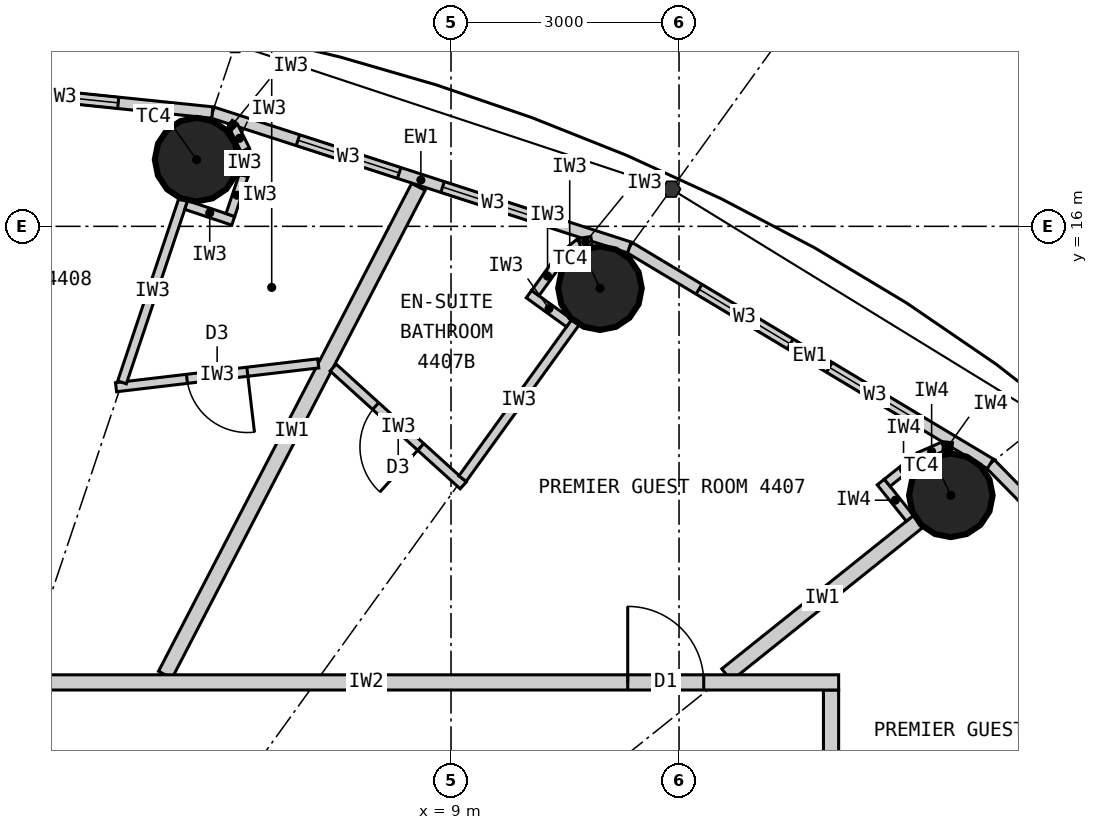
"""IFC4 building model, lengths in metres.
Left out: names, types, materials, properties, quantities, classifications, styles, units other than length and angle.
Written with IfcOpenShell. Run it as: python <this file> out.ifc"""

import sys

from ifc_helpers import new_model, si_unit, direction, frame, frame_2d, origin, origin_2d, place, context, subcontext, project, spatial, rectangle, circle, extrude, element, fill, save


model = new_model("IFC4")
c1 = context("Model", 3, precision=1e-05, world=origin(), true_north=direction((0.0, 1.0)))
c2 = subcontext(c1, "Body", "Model", "MODEL_VIEW")
j1 = project(units=[si_unit("LENGTHUNIT", "METRE"), si_unit("PLANEANGLEUNIT", "RADIAN")], contexts=[c1])
p1 = place(None, origin())
s1 = spatial("IfcSite", under=j1, at=p1, CompositionType="ELEMENT")
p2 = place(p1, origin())
s2 = spatial("IfcBuilding", under=s1, at=p2, CompositionType="ELEMENT")
p3 = place(p2, frame((0.0, 0.0, 166.5)))
s3 = spatial("IfcBuildingStorey", under=s2, at=p3, CompositionType="ELEMENT", Elevation=166.5)
for number, where, z_axis, x_axis in (
    (1, (15.576, 12.461, 0.0), (0.0, 0.0, 1.0), (1.0, 0.0, 0.0)),
    (2, (10.96, 15.186, 0.0), (0.0, 0.0, 1.0), (1.0, 0.0, 0.0)),
    (3, (5.653, 16.877, 0.0), (0.0, 0.0, 1.0), (1.0, 0.0, 0.0)),
):
    element("IfcColumn", number, at=place(p3, frame(where, z_axis=z_axis, x_axis=x_axis)), inside=s3, PredefinedType="COLUMN", context=c2, shape_type="SweptSolid", body=[
        extrude(circle(Radius=0.55, at=origin_2d()), origin(), (0.0, 0.0, 1.0), 3.3),
    ])
p4 = place(p3, frame((19.772, 9.132, 0.0), z_axis=(0.0, 0.0, 1.0), x_axis=(-0.700727467776, 0.71342905457, 0.0)))
e4 = element("IfcWall", 4, at=p4, inside=s3, PredefinedType="ELEMENTEDWALL", context=c2, shape_type="SweptSolid", body=[
    extrude(rectangle(XDim=5.247, YDim=0.15, at=frame_2d((2.624, 0.0))), origin(), (0.0, 0.0, 1.0), 3.12),
])
p5 = place(p4, frame((0.924, 0.0, 0.9)))
e5 = element("IfcOpeningElement", 5, at=p5, cuts=e4, PredefinedType="OPENING", context=c2, shape_type="SweptSolid", body=[
    extrude(rectangle(XDim=1.4, YDim=1.9, at=frame_2d((0.7, 0.95))), frame((0.0, 0.085, 0.0), z_axis=(0.0, -1.0, 0.0), x_axis=(1.0, 0.0, 0.0)), (0.0, 0.0, 1.0), 0.17),
])
p6 = place(p4, frame((2.924, 0.0, 0.9)))
e6 = element("IfcOpeningElement", 6, at=p6, cuts=e4, PredefinedType="OPENING", context=c2, shape_type="SweptSolid", body=[
    extrude(rectangle(XDim=1.4, YDim=1.9, at=frame_2d((0.7, 0.95))), frame((0.0, 0.085, 0.0), z_axis=(0.0, -1.0, 0.0), x_axis=(1.0, 0.0, 0.0)), (0.0, 0.0, 1.0), 0.17),
])
p7 = place(p3, frame((16.095, 12.876, 0.0), z_axis=(0.0, 0.0, 1.0), x_axis=(-0.857695199231, 0.514158482587, 0.0)))
e7 = element("IfcWall", 7, at=p7, inside=s3, PredefinedType="ELEMENTEDWALL", context=c2, shape_type="SweptSolid", body=[
    extrude(rectangle(XDim=5.536, YDim=0.15, at=frame_2d((2.768, 0.0))), origin(), (0.0, 0.0, 1.0), 3.12),
])
p8 = place(p7, frame((1.068, 0.0, 0.9)))
e8 = element("IfcOpeningElement", 8, at=p8, cuts=e7, PredefinedType="OPENING", context=c2, shape_type="SweptSolid", body=[
    extrude(rectangle(XDim=1.4, YDim=1.9, at=frame_2d((0.7, 0.95))), frame((0.0, 0.085, 0.0), z_axis=(0.0, -1.0, 0.0), x_axis=(1.0, 0.0, 0.0)), (0.0, 0.0, 1.0), 0.17),
])
p9 = place(p7, frame((3.068, 0.0, 0.9)))
e9 = element("IfcOpeningElement", 9, at=p9, cuts=e7, PredefinedType="OPENING", context=c2, shape_type="SweptSolid", body=[
    extrude(rectangle(XDim=1.4, YDim=1.9, at=frame_2d((0.7, 0.95))), frame((0.0, 0.085, 0.0), z_axis=(0.0, -1.0, 0.0), x_axis=(1.0, 0.0, 0.0)), (0.0, 0.0, 1.0), 0.17),
])
p10 = place(p3, frame((11.346, 15.722, 0.0), z_axis=(0.0, 0.0, 1.0), x_axis=(-0.951432482129, 0.307857486429, 0.0)))
e10 = element("IfcWall", 10, at=p10, inside=s3, PredefinedType="ELEMENTEDWALL", context=c2, shape_type="SweptSolid", body=[
    extrude(rectangle(XDim=5.766, YDim=0.15, at=frame_2d((2.883, 0.0))), origin(), (0.0, 0.0, 1.0), 3.12),
])
p11 = place(p10, frame((1.183, 0.0, 0.9)))
e11 = element("IfcOpeningElement", 11, at=p11, cuts=e10, PredefinedType="OPENING", context=c2, shape_type="SweptSolid", body=[
    extrude(rectangle(XDim=1.4, YDim=1.9, at=frame_2d((0.7, 0.95))), frame((0.0, 0.085, 0.0), z_axis=(0.0, -1.0, 0.0), x_axis=(1.0, 0.0, 0.0)), (0.0, 0.0, 1.0), 0.17),
])
p12 = place(p10, frame((3.183, 0.0, 0.9)))
e12 = element("IfcOpeningElement", 12, at=p12, cuts=e10, PredefinedType="OPENING", context=c2, shape_type="SweptSolid", body=[
    extrude(rectangle(XDim=1.4, YDim=1.9, at=frame_2d((0.7, 0.95))), frame((0.0, 0.085, 0.0), z_axis=(0.0, -1.0, 0.0), x_axis=(1.0, 0.0, 0.0)), (0.0, 0.0, 1.0), 0.17),
])
p13 = place(p3, frame((5.86, 17.497, 0.0), z_axis=(0.0, 0.0, 1.0), x_axis=(-0.994751738032, 0.102318032045, 0.0)))
e13 = element("IfcWall", 13, at=p13, inside=s3, PredefinedType="ELEMENTEDWALL", context=c2, shape_type="SweptSolid", body=[
    extrude(rectangle(XDim=5.891, YDim=0.15, at=frame_2d((2.946, 0.0))), origin(), (0.0, 0.0, 1.0), 3.12),
])
p14 = place(p13, frame((1.246, 0.0, 0.9)))
e14 = element("IfcOpeningElement", 14, at=p14, cuts=e13, PredefinedType="OPENING", context=c2, shape_type="SweptSolid", body=[
    extrude(rectangle(XDim=1.4, YDim=1.9, at=frame_2d((0.7, 0.95))), frame((0.0, 0.085, 0.0), z_axis=(0.0, -1.0, 0.0), x_axis=(1.0, 0.0, 0.0)), (0.0, 0.0, 1.0), 0.17),
])
p15 = place(p13, frame((3.246, 0.0, 0.9)))
e15 = element("IfcOpeningElement", 15, at=p15, cuts=e13, PredefinedType="OPENING", context=c2, shape_type="SweptSolid", body=[
    extrude(rectangle(XDim=1.4, YDim=1.9, at=frame_2d((0.7, 0.95))), frame((0.0, 0.085, 0.0), z_axis=(0.0, -1.0, 0.0), x_axis=(1.0, 0.0, 0.0)), (0.0, 0.0, 1.0), 0.17),
])
p16 = place(p3, frame((14.0, -9.9, 0.0), z_axis=(0.0, 0.0, 1.0), x_axis=(0.0, 1.0, 0.0)))
e16 = element("IfcWall", 16, at=p16, inside=s3, PredefinedType="PARTITIONING", context=c2, shape_type="SweptSolid", body=[
    extrude(rectangle(XDim=19.8, YDim=0.2, at=frame_2d((9.9, 0.0))), origin(), (0.0, 0.0, 1.0), 3.12),
])
p17 = place(p16, frame((3.688, 0.0, 0.0)))
e17 = element("IfcOpeningElement", 17, at=p17, cuts=e16, PredefinedType="OPENING", context=c2, shape_type="SweptSolid", body=[
    extrude(rectangle(XDim=1.0, YDim=2.2, at=frame_2d((0.5, 1.1))), frame((0.0, 0.11, 0.0), z_axis=(0.0, -1.0, 0.0), x_axis=(1.0, 0.0, 0.0)), (0.0, 0.0, 1.0), 0.22),
])
p18 = place(p16, frame((9.979, 0.0, 0.0)))
e18 = element("IfcOpeningElement", 18, at=p18, cuts=e16, PredefinedType="OPENING", context=c2, shape_type="SweptSolid", body=[
    extrude(rectangle(XDim=1.0, YDim=2.2, at=frame_2d((0.5, 1.1))), frame((0.0, 0.11, 0.0), z_axis=(0.0, -1.0, 0.0), x_axis=(1.0, 0.0, 0.0)), (0.0, 0.0, 1.0), 0.22),
])
p19 = place(p16, frame((17.122, 0.0, 0.0)))
e19 = element("IfcOpeningElement", 19, at=p19, cuts=e16, PredefinedType="OPENING", context=c2, shape_type="SweptSolid", body=[
    extrude(rectangle(XDim=1.0, YDim=2.2, at=frame_2d((0.5, 1.1))), frame((0.0, 0.11, 0.0), z_axis=(0.0, -1.0, 0.0), x_axis=(1.0, 0.0, 0.0)), (0.0, 0.0, 1.0), 0.22),
])
p20 = place(p3, frame((12.625, 10.1, 0.0), z_axis=(0.0, 0.0, 1.0), x_axis=(0.780876185034, 0.624685827954, 0.0)))
e20 = element("IfcWall", 20, at=p20, inside=s3, PredefinedType="PARTITIONING", context=c2, shape_type="SweptSolid", body=[
    extrude(rectangle(XDim=3.229, YDim=0.2, at=frame_2d((1.615, 0.0))), origin(), (0.0, 0.0, 1.0), 2.42),
])
p21 = place(p3, frame((5.24, 10.1, 0.0), z_axis=(0.0, 0.0, 1.0), x_axis=(0.460532965373, 0.887642601391, 0.0)))
e21 = element("IfcWall", 21, at=p21, inside=s3, PredefinedType="PARTITIONING", context=c2, shape_type="SweptSolid", body=[
    extrude(rectangle(XDim=7.231, YDim=0.2, at=frame_2d((3.616, 0.0))), origin(), (0.0, 0.0, 1.0), 3.12),
])
p22 = place(p3, frame((7.45, 14.142, 0.0), z_axis=(0.0, 0.0, 1.0), x_axis=(0.74113984586, -0.671350675041, 0.0)))
e22 = element("IfcWall", 22, at=p22, inside=s3, PredefinedType="PARTITIONING", context=c2, shape_type="SweptSolid", body=[
    extrude(rectangle(XDim=2.309, YDim=0.12, at=frame_2d((1.154, 0.0))), origin(), (0.0, 0.0, 1.0), 3.12),
])
p23 = place(p22, frame((0.754, 0.0, 0.0)))
e23 = element("IfcOpeningElement", 23, at=p23, cuts=e22, PredefinedType="OPENING", context=c2, shape_type="SweptSolid", body=[
    extrude(rectangle(XDim=0.8, YDim=2.1, at=frame_2d((0.4, 1.05))), frame((0.0, 0.07, 0.0), z_axis=(0.0, -1.0, 0.0), x_axis=(1.0, 0.0, 0.0)), (0.0, 0.0, 1.0), 0.14),
])
p24 = place(p3, frame((9.151, 12.681, 0.0), z_axis=(0.0, 0.0, 1.0), x_axis=(0.585258912334, 0.8108464747, 0.0)))
e24 = element("IfcWall", 24, at=p24, inside=s3, PredefinedType="PARTITIONING", context=c2, shape_type="SweptSolid", body=[
    extrude(rectangle(XDim=2.54, YDim=0.12, at=frame_2d((1.27, 0.0))), origin(), (0.0, 0.0, 1.0), 2.42),
])
p25 = place(p3, frame((10.554, 14.727, 0.0), z_axis=(0.0, 0.0, 1.0), x_axis=(-0.811044231224, 0.584984833135, 0.0)))
e25 = element("IfcWall", 25, at=p25, inside=s3, PredefinedType="PARTITIONING", context=c2, shape_type="SweptSolid", body=[
    extrude(rectangle(XDim=0.652, YDim=0.12, at=frame_2d((0.326, 0.0))), origin(), (0.0, 0.0, 1.0), 3.12),
])
p26 = place(p3, frame((10.109, 15.122, 0.0), z_axis=(0.0, 0.0, 1.0), x_axis=(0.585344718358, 0.810784534072, 0.0)))
e26 = element("IfcWall", 26, at=p26, inside=s3, PredefinedType="PARTITIONING", context=c2, shape_type="SweptSolid", body=[
    extrude(rectangle(XDim=0.55, YDim=0.12, at=frame_2d((0.275, 0.0))), origin(), (0.0, 0.0, 1.0), 3.12),
])
p27 = place(p3, frame((10.431, 15.568, 0.0), z_axis=(0.0, 0.0, 1.0), x_axis=(0.77505137267, 0.631898227345, 0.0)))
e27 = element("IfcWall", 27, at=p27, inside=s3, PredefinedType="PARTITIONING", context=c2, shape_type="SweptSolid", body=[
    extrude(rectangle(XDim=0.338, YDim=0.12, at=frame_2d((0.169, 0.0))), origin(), (0.0, 0.0, 1.0), 3.12),
])
p28 = place(p3, frame((10.693, 15.781, 0.0), z_axis=(0.0, 0.0, 1.0), x_axis=(0.987256785332, 0.159135287777, 0.0)))
e28 = element("IfcWall", 28, at=p28, inside=s3, PredefinedType="PARTITIONING", context=c2, shape_type="SweptSolid", body=[
    extrude(rectangle(XDim=0.158, YDim=0.12, at=frame_2d((0.079, 0.0))), origin(), (0.0, 0.0, 1.0), 3.12),
])
p29 = place(p3, frame((7.253, 14.197, 0.0), z_axis=(0.0, 0.0, 1.0), x_axis=(-0.993128188393, -0.117031625725, 0.0)))
e29 = element("IfcWall", 29, at=p29, inside=s3, PredefinedType="PARTITIONING", context=c2, shape_type="SweptSolid", body=[
    extrude(rectangle(XDim=2.678, YDim=0.12, at=frame_2d((1.339, 0.0))), origin(), (0.0, 0.0, 1.0), 3.12),
])
p30 = place(p29, frame((0.939, 0.0, 0.0)))
e30 = element("IfcOpeningElement", 30, at=p30, cuts=e29, PredefinedType="OPENING", context=c2, shape_type="SweptSolid", body=[
    extrude(rectangle(XDim=0.8, YDim=2.1, at=frame_2d((0.4, 1.05))), frame((0.0, 0.07, 0.0), z_axis=(0.0, -1.0, 0.0), x_axis=(1.0, 0.0, 0.0)), (0.0, 0.0, 1.0), 0.14),
])
p31 = place(p3, frame((4.671, 13.948, 0.0), z_axis=(0.0, 0.0, 1.0), x_axis=(0.317669167093, 0.948201613729, 0.0)))
e31 = element("IfcWall", 31, at=p31, inside=s3, PredefinedType="PARTITIONING", context=c2, shape_type="SweptSolid", body=[
    extrude(rectangle(XDim=2.54, YDim=0.12, at=frame_2d((1.27, 0.0))), origin(), (0.0, 0.0, 1.0), 2.42),
])
p32 = place(p3, frame((5.516, 16.28, 0.0), z_axis=(0.0, 0.0, 1.0), x_axis=(0.948157944392, -0.317799484717, 0.0)))
e32 = element("IfcWall", 32, at=p32, inside=s3, PredefinedType="PARTITIONING", context=c2, shape_type="SweptSolid", body=[
    extrude(rectangle(XDim=0.652, YDim=0.12, at=frame_2d((0.326, 0.0))), origin(), (0.0, 0.0, 1.0), 3.12),
])
p33 = place(p3, frame((6.097, 16.149, 0.0), z_axis=(0.0, 0.0, 1.0), x_axis=(0.317292604854, 0.948327687514, 0.0)))
e33 = element("IfcWall", 33, at=p33, inside=s3, PredefinedType="PARTITIONING", context=c2, shape_type="SweptSolid", body=[
    extrude(rectangle(XDim=0.55, YDim=0.12, at=frame_2d((0.275, 0.0))), origin(), (0.0, 0.0, 1.0), 3.12),
])
for number, where, z_axis, x_axis in (
    (34, (6.271, 16.67, 0.0), (0.0, 0.0, 1.0), (0.061, 0.998, 0.0)),
    (35, (6.292, 17.007, 0.0), (0.0, 0.0, 1.0), (-0.445, 0.895, 0.0)),
):
    element("IfcWall", number, at=place(p3, frame(where, z_axis=z_axis, x_axis=x_axis)), inside=s3, PredefinedType="PARTITIONING", context=c2, shape_type="SweptSolid", body=[
        extrude(rectangle(XDim=0.338, YDim=0.12, at=frame_2d((0.169, 0.0))), origin(), (0.0, 0.0, 1.0), 3.12),
    ])
p34 = place(p3, frame((6.142, 17.31, 0.0), z_axis=(0.0, 0.0, 1.0), x_axis=(-0.835039693181, 0.550189704386, 0.0)))
e36 = element("IfcWall", 36, at=p34, inside=s3, PredefinedType="PARTITIONING", context=c2, shape_type="SweptSolid", body=[
    extrude(rectangle(XDim=0.062, YDim=0.12, at=frame_2d((0.031, 0.0))), origin(), (0.0, 0.0, 1.0), 3.12),
])
p35 = place(p3, frame((1.67, 10.0, 0.0), z_axis=(0.0, 0.0, 1.0), x_axis=(1.0, 0.0, 0.0)))
e37 = element("IfcWall", 37, at=p35, inside=s3, PredefinedType="PARTITIONING", context=c2, shape_type="SweptSolid", body=[
    extrude(rectangle(XDim=12.43, YDim=0.2, at=frame_2d((6.215, 0.0))), origin(), (0.0, 0.0, 1.0), 3.12),
])
p36 = place(p35, frame((9.655, 0.0, 0.0)))
e38 = element("IfcOpeningElement", 38, at=p36, cuts=e37, PredefinedType="OPENING", context=c2, shape_type="SweptSolid", body=[
    extrude(rectangle(XDim=1.0, YDim=2.2, at=frame_2d((0.5, 1.1))), frame((0.0, 0.11, 0.0), z_axis=(0.0, -1.0, 0.0), x_axis=(1.0, 0.0, 0.0)), (0.0, 0.0, 1.0), 0.22),
])
p37 = place(p3, frame((15.037, 12.158, 0.0), z_axis=(0.0, 0.0, 1.0), x_axis=(-0.624840920722, 0.78075208856, 0.0)))
e39 = element("IfcWall", 39, at=p37, inside=s3, PredefinedType="PARTITIONING", context=c2, shape_type="SweptSolid", body=[
    extrude(rectangle(XDim=0.612, YDim=0.12, at=frame_2d((0.306, 0.0))), origin(), (0.0, 0.0, 1.0), 3.12),
])
p38 = place(p3, frame((14.739, 12.627, 0.0), z_axis=(0.0, 0.0, 1.0), x_axis=(0.780912119987, 0.624640905527, 0.0)))
e40 = element("IfcWall", 40, at=p38, inside=s3, PredefinedType="PARTITIONING", context=c2, shape_type="SweptSolid", body=[
    extrude(rectangle(XDim=0.55, YDim=0.12, at=frame_2d((0.275, 0.0))), origin(), (0.0, 0.0, 1.0), 3.12),
])
p39 = place(p3, frame((15.169, 12.97, 0.0), z_axis=(0.0, 0.0, 1.0), x_axis=(0.915974725257, 0.401235968838, 0.0)))
e41 = element("IfcWall", 41, at=p39, inside=s3, PredefinedType="PARTITIONING", context=c2, shape_type="SweptSolid", body=[
    extrude(rectangle(XDim=0.338, YDim=0.12, at=frame_2d((0.169, 0.0))), origin(), (0.0, 0.0, 1.0), 3.12),
])
p40 = place(p3, frame((15.478, 13.106, 0.0), z_axis=(0.0, 0.0, 1.0), x_axis=(0.993778813557, -0.111371763588, 0.0)))
e42 = element("IfcWall", 42, at=p40, inside=s3, PredefinedType="PARTITIONING", context=c2, shape_type="SweptSolid", body=[
    extrude(rectangle(XDim=0.114, YDim=0.12, at=frame_2d((0.057, 0.0))), origin(), (0.0, 0.0, 1.0), 3.12),
])
p41 = place(p8, origin())
e43 = element("IfcWindow", 43, at=p41, inside=s3, PartitioningType="SINGLE_PANEL", PredefinedType="WINDOW", context=c2, shape_type="SweptSolid", body=[
    extrude(rectangle(XDim=1.4, YDim=1.9, at=frame_2d((0.7, 0.95))), frame((0.0, 0.03, 0.0), z_axis=(0.0, -1.0, 0.0), x_axis=(1.0, 0.0, 0.0)), (0.0, 0.0, 1.0), 0.06),
])
fill(e8, e43)
p42 = place(p9, origin())
e44 = element("IfcWindow", 44, at=p42, inside=s3, PartitioningType="SINGLE_PANEL", PredefinedType="WINDOW", context=c2, shape_type="SweptSolid", body=[
    extrude(rectangle(XDim=1.4, YDim=1.9, at=frame_2d((0.7, 0.95))), frame((0.0, 0.03, 0.0), z_axis=(0.0, -1.0, 0.0), x_axis=(1.0, 0.0, 0.0)), (0.0, 0.0, 1.0), 0.06),
])
fill(e9, e44)
p43 = place(p11, origin())
e45 = element("IfcWindow", 45, at=p43, inside=s3, PartitioningType="SINGLE_PANEL", PredefinedType="WINDOW", context=c2, shape_type="SweptSolid", body=[
    extrude(rectangle(XDim=1.4, YDim=1.9, at=frame_2d((0.7, 0.95))), frame((0.0, 0.03, 0.0), z_axis=(0.0, -1.0, 0.0), x_axis=(1.0, 0.0, 0.0)), (0.0, 0.0, 1.0), 0.06),
])
fill(e11, e45)
p44 = place(p12, origin())
e46 = element("IfcWindow", 46, at=p44, inside=s3, PartitioningType="SINGLE_PANEL", PredefinedType="WINDOW", context=c2, shape_type="SweptSolid", body=[
    extrude(rectangle(XDim=1.4, YDim=1.9, at=frame_2d((0.7, 0.95))), frame((0.0, 0.03, 0.0), z_axis=(0.0, -1.0, 0.0), x_axis=(1.0, 0.0, 0.0)), (0.0, 0.0, 1.0), 0.06),
])
fill(e12, e46)
p45 = place(p14, origin())
e47 = element("IfcWindow", 47, at=p45, inside=s3, PartitioningType="SINGLE_PANEL", PredefinedType="WINDOW", context=c2, shape_type="SweptSolid", body=[
    extrude(rectangle(XDim=1.4, YDim=1.9, at=frame_2d((0.7, 0.95))), frame((0.0, 0.03, 0.0), z_axis=(0.0, -1.0, 0.0), x_axis=(1.0, 0.0, 0.0)), (0.0, 0.0, 1.0), 0.06),
])
fill(e14, e47)
p46 = place(p23, origin())
e48 = element("IfcDoor", 48, at=p46, inside=s3, OperationType="SINGLE_SWING_RIGHT", PredefinedType="DOOR", context=c2, shape_type="SweptSolid", body=[
    extrude(rectangle(XDim=0.8, YDim=2.1, at=frame_2d((0.4, 1.05))), frame((0.0, 0.025, 0.0), z_axis=(0.0, -1.0, 0.0), x_axis=(1.0, 0.0, 0.0)), (0.0, 0.0, 1.0), 0.05),
])
fill(e23, e48)
p47 = place(p36, origin())
e49 = element("IfcDoor", 49, at=p47, inside=s3, OperationType="SINGLE_SWING_LEFT", PredefinedType="DOOR", context=c2, shape_type="SweptSolid", body=[
    extrude(rectangle(XDim=1.0, YDim=2.2, at=frame_2d((0.5, 1.1))), frame((0.0, 0.025, 0.0), z_axis=(0.0, -1.0, 0.0), x_axis=(1.0, 0.0, 0.0)), (0.0, 0.0, 1.0), 0.05),
])
fill(e38, e49)
p48 = place(p30, origin())
e50 = element("IfcDoor", 50, at=p48, inside=s3, OperationType="SINGLE_SWING_LEFT", PredefinedType="DOOR", context=c2, shape_type="SweptSolid", body=[
    extrude(rectangle(XDim=0.8, YDim=2.1, at=frame_2d((0.4, 1.05))), frame((0.0, 0.025, 0.0), z_axis=(0.0, -1.0, 0.0), x_axis=(1.0, 0.0, 0.0)), (0.0, 0.0, 1.0), 0.05),
])
fill(e30, e50)
save(model, sys.argv[1])
